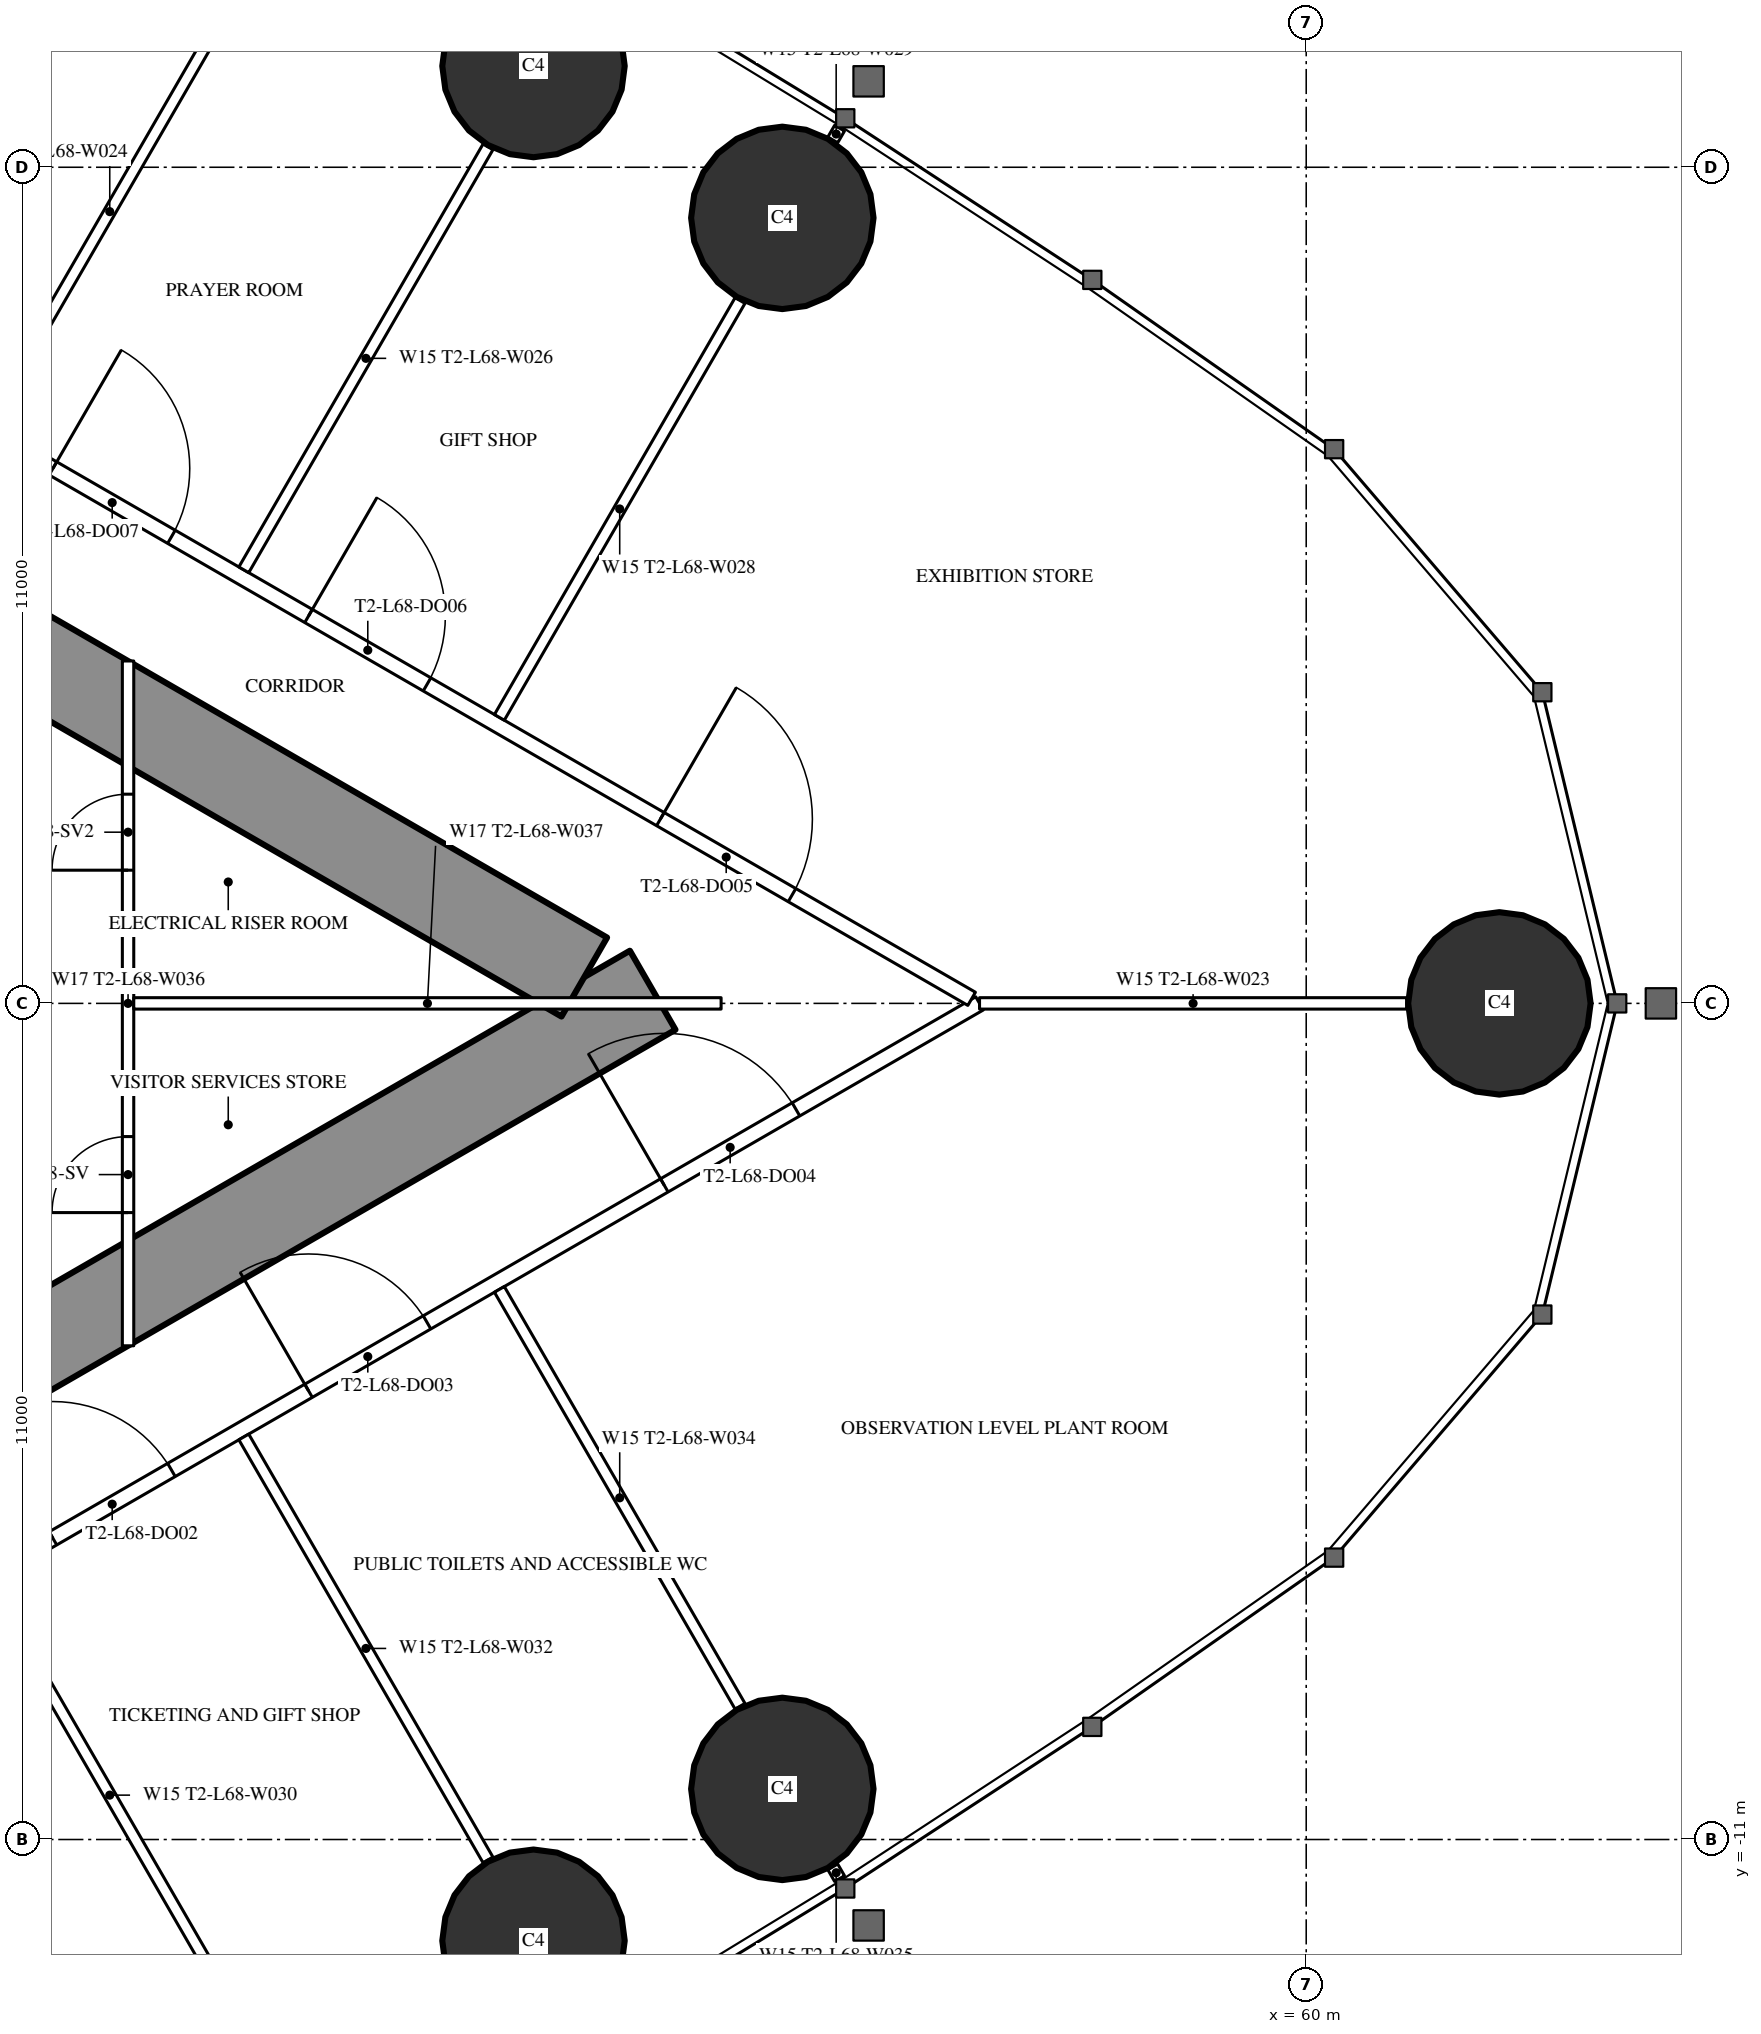
"""IFC4 building model, lengths in metres.
Left out: names, types, materials, properties, quantities, classifications, styles, units other than length and angle.
Written with IfcOpenShell. Run it as: python <this file> out.ifc"""

import sys

from ifc_helpers import new_model, si_unit, direction, frame, frame_2d, origin, origin_2d, place, context, subcontext, project, spatial, rectangle, circle, extrude, element, fill, save


model = new_model("IFC4")
c1 = context("Model", 3, precision=1e-05, world=origin(), true_north=direction((0.0, 1.0)))
c2 = subcontext(c1, "Body", "Model", "MODEL_VIEW")
j1 = project(units=[si_unit("LENGTHUNIT", "METRE"), si_unit("PLANEANGLEUNIT", "RADIAN")], contexts=[c1])
p1 = place(None, origin())
s1 = spatial("IfcSite", under=j1, at=p1, CompositionType="ELEMENT")
p2 = place(p1, origin())
s2 = spatial("IfcBuilding", under=s1, at=p2, CompositionType="ELEMENT")
p3 = place(p2, frame((0.0, 0.0, 257.3)))
s3 = spatial("IfcBuildingStorey", under=s2, at=p3, CompositionType="ELEMENT", Elevation=257.3)
for number, where, z_axis, x_axis in (
    (1, (62.542, 0.0, 0.0), (0.0, 0.0, 1.0), (1.0, 0.0, 0.0)),
    (2, (53.108, 10.334, 0.0), (0.0, 0.0, 1.0), (1.0, 0.0, 0.0)),
    (3, (49.834, 12.332, 0.0), (0.0, 0.0, 1.0), (1.0, 0.0, 0.0)),
    (4, (49.834, -12.332, 0.0), (0.0, 0.0, 1.0), (1.0, 0.0, 0.0)),
    (5, (53.108, -10.334, 0.0), (0.0, 0.0, 1.0), (1.0, 0.0, 0.0)),
):
    element("IfcColumn", number, at=place(p3, frame(where, z_axis=z_axis, x_axis=x_axis)), inside=s3, PredefinedType="COLUMN", context=c2, shape_type="SweptSolid", body=[
        extrude(circle(Radius=1.2, at=origin_2d()), origin(), (0.0, 0.0, 1.0), 6.0),
    ])
p4 = place(p3, frame((27.2, -13.8, 0.0), z_axis=(0.0, 0.0, 1.0), x_axis=(0.866027159892, 0.499996958321, 0.0)))
e6 = element("IfcWall", 6, at=p4, inside=s3, PredefinedType="SHEAR", context=c2, shape_type="SweptSolid", body=[
    extrude(rectangle(XDim=27.947, YDim=1.2, at=frame_2d((13.973, 0.0))), origin(), (0.0, 0.0, 1.0), 6.0),
])
p5 = place(p4, frame((4.6, 0.0, 0.0)))
e7 = element("IfcOpeningElement", 7, at=p5, cuts=e6, PredefinedType="OPENING", context=c2, shape_type="SweptSolid", body=[
    extrude(rectangle(XDim=1.0, YDim=2.2, at=frame_2d((0.5, 1.1))), frame((0.0, 0.61, 0.0), z_axis=(0.0, -1.0, 0.0), x_axis=(1.0, 0.0, 0.0)), (0.0, 0.0, 1.0), 1.22),
])
p6 = place(p4, frame((13.395, 0.0, 0.0)))
e8 = element("IfcOpeningElement", 8, at=p6, cuts=e6, PredefinedType="OPENING", context=c2, shape_type="SweptSolid", body=[
    extrude(rectangle(XDim=1.8, YDim=2.2, at=frame_2d((0.9, 1.1))), frame((0.0, 0.61, 0.0), z_axis=(0.0, -1.0, 0.0), x_axis=(1.0, 0.0, 0.0)), (0.0, 0.0, 1.0), 1.22),
])
p7 = place(p3, frame((27.2, 13.8, 0.0), z_axis=(0.0, 0.0, 1.0), x_axis=(0.866024515034, -0.500001539357, 0.0)))
e9 = element("IfcWall", 9, at=p7, inside=s3, PredefinedType="SHEAR", context=c2, shape_type="SweptSolid", body=[
    extrude(rectangle(XDim=26.907, YDim=1.2, at=frame_2d((13.454, 0.0))), origin(), (0.0, 0.0, 1.0), 6.0),
])
p8 = place(p7, frame((4.6, 0.0, 0.0)))
e10 = element("IfcOpeningElement", 10, at=p8, cuts=e9, PredefinedType="OPENING", context=c2, shape_type="SweptSolid", body=[
    extrude(rectangle(XDim=1.0, YDim=2.2, at=frame_2d((0.5, 1.1))), frame((0.0, 0.61, 0.0), z_axis=(0.0, -1.0, 0.0), x_axis=(1.0, 0.0, 0.0)), (0.0, 0.0, 1.0), 1.22),
])
p9 = place(p7, frame((13.395, 0.0, 0.0)))
e11 = element("IfcOpeningElement", 11, at=p9, cuts=e9, PredefinedType="OPENING", context=c2, shape_type="SweptSolid", body=[
    extrude(rectangle(XDim=1.8, YDim=2.2, at=frame_2d((0.9, 1.1))), frame((0.0, 0.61, 0.0), z_axis=(0.0, -1.0, 0.0), x_axis=(1.0, 0.0, 0.0)), (0.0, 0.0, 1.0), 1.22),
])
p10 = place(p3, frame((28.907, -15.47, 0.0), z_axis=(0.0, 0.0, 1.0), x_axis=(0.866023700353, 0.500002950419, 0.0)))
e12 = element("IfcWall", 12, at=p10, inside=s3, PredefinedType="PARTITIONING", context=c2, shape_type="SweptSolid", body=[
    extrude(rectangle(XDim=30.941, YDim=0.2, at=frame_2d((15.47, 0.0))), origin(), (0.0, 0.0, 1.0), 5.75),
])
p11 = place(p10, frame((7.024, 0.0, 0.0)))
e13 = element("IfcOpeningElement", 13, at=p11, cuts=e12, PredefinedType="OPENING", context=c2, shape_type="SweptSolid", body=[
    extrude(rectangle(XDim=2.0, YDim=2.4, at=frame_2d((1.0, 1.2))), frame((0.0, 0.11, 0.0), z_axis=(0.0, -1.0, 0.0), x_axis=(1.0, 0.0, 0.0)), (0.0, 0.0, 1.0), 0.22),
])
p12 = place(p10, frame((16.865, 0.0, 0.0)))
e14 = element("IfcOpeningElement", 14, at=p12, cuts=e12, PredefinedType="OPENING", context=c2, shape_type="SweptSolid", body=[
    extrude(rectangle(XDim=1.8, YDim=2.2, at=frame_2d((0.9, 1.1))), frame((0.0, 0.11, 0.0), z_axis=(0.0, -1.0, 0.0), x_axis=(1.0, 0.0, 0.0)), (0.0, 0.0, 1.0), 0.22),
])
p13 = place(p10, frame((20.748, 0.0, 0.0)))
e15 = element("IfcOpeningElement", 15, at=p13, cuts=e12, PredefinedType="OPENING", context=c2, shape_type="SweptSolid", body=[
    extrude(rectangle(XDim=1.8, YDim=2.2, at=frame_2d((0.9, 1.1))), frame((0.0, 0.11, 0.0), z_axis=(0.0, -1.0, 0.0), x_axis=(1.0, 0.0, 0.0)), (0.0, 0.0, 1.0), 0.22),
])
p14 = place(p10, frame((26.152, 0.0, 0.0)))
e16 = element("IfcOpeningElement", 16, at=p14, cuts=e12, PredefinedType="OPENING", context=c2, shape_type="SweptSolid", body=[
    extrude(rectangle(XDim=2.0, YDim=2.4, at=frame_2d((1.0, 1.2))), frame((0.0, 0.11, 0.0), z_axis=(0.0, -1.0, 0.0), x_axis=(1.0, 0.0, 0.0)), (0.0, 0.0, 1.0), 0.22),
])
p15 = place(p3, frame((28.907, 15.47, 0.0), z_axis=(0.0, 0.0, 1.0), x_axis=(0.866025841386, -0.499999242051, 0.0)))
e17 = element("IfcWall", 17, at=p15, inside=s3, PredefinedType="PARTITIONING", context=c2, shape_type="SweptSolid", body=[
    extrude(rectangle(XDim=30.821, YDim=0.2, at=frame_2d((15.41, 0.0))), origin(), (0.0, 0.0, 1.0), 5.75),
])
p16 = place(p15, frame((26.092, 0.0, 0.0)))
e18 = element("IfcOpeningElement", 18, at=p16, cuts=e17, PredefinedType="OPENING", context=c2, shape_type="SweptSolid", body=[
    extrude(rectangle(XDim=2.0, YDim=2.4, at=frame_2d((1.0, 1.2))), frame((0.0, 0.11, 0.0), z_axis=(0.0, -1.0, 0.0), x_axis=(1.0, 0.0, 0.0)), (0.0, 0.0, 1.0), 0.22),
])
p17 = place(p15, frame((20.748, 0.0, 0.0)))
e19 = element("IfcOpeningElement", 19, at=p17, cuts=e17, PredefinedType="OPENING", context=c2, shape_type="SweptSolid", body=[
    extrude(rectangle(XDim=1.8, YDim=2.2, at=frame_2d((0.9, 1.1))), frame((0.0, 0.11, 0.0), z_axis=(0.0, -1.0, 0.0), x_axis=(1.0, 0.0, 0.0)), (0.0, 0.0, 1.0), 0.22),
])
p18 = place(p15, frame((16.865, 0.0, 0.0)))
e20 = element("IfcOpeningElement", 20, at=p18, cuts=e17, PredefinedType="OPENING", context=c2, shape_type="SweptSolid", body=[
    extrude(rectangle(XDim=1.8, YDim=2.2, at=frame_2d((0.9, 1.1))), frame((0.0, 0.11, 0.0), z_axis=(0.0, -1.0, 0.0), x_axis=(1.0, 0.0, 0.0)), (0.0, 0.0, 1.0), 0.22),
])
p19 = place(p15, frame((7.024, 0.0, 0.0)))
e21 = element("IfcOpeningElement", 21, at=p19, cuts=e17, PredefinedType="OPENING", context=c2, shape_type="SweptSolid", body=[
    extrude(rectangle(XDim=2.0, YDim=2.4, at=frame_2d((1.0, 1.2))), frame((0.0, 0.11, 0.0), z_axis=(0.0, -1.0, 0.0), x_axis=(1.0, 0.0, 0.0)), (0.0, 0.0, 1.0), 0.22),
])
p20 = place(p3, frame((42.66, -7.646, 0.0), z_axis=(0.0, 0.0, 1.0), x_axis=(0.499996592859, -0.866027370889, 0.0)))
e22 = element("IfcWall", 22, at=p20, inside=s3, PredefinedType="PARTITIONING", context=c2, shape_type="SweptSolid", body=[
    extrude(rectangle(XDim=6.398, YDim=0.15, at=frame_2d((3.199, 0.0))), origin(), (0.0, 0.0, 1.0), 4.85),
])
p21 = place(p3, frame((46.023, -5.704, 0.0), z_axis=(0.0, 0.0, 1.0), x_axis=(0.499984478165, -0.866034365135, 0.0)))
e23 = element("IfcWall", 23, at=p21, inside=s3, PredefinedType="PARTITIONING", context=c2, shape_type="SweptSolid", body=[
    extrude(rectangle(XDim=6.426, YDim=0.15, at=frame_2d((3.213, 0.0))), origin(), (0.0, 0.0, 1.0), 4.85),
])
p22 = place(p3, frame((49.385, -3.763, 0.0), z_axis=(0.0, 0.0, 1.0), x_axis=(0.499999447814, -0.866025722589, 0.0)))
e24 = element("IfcWall", 24, at=p22, inside=s3, PredefinedType="PARTITIONING", context=c2, shape_type="SweptSolid", body=[
    extrude(rectangle(XDim=6.333, YDim=0.15, at=frame_2d((3.166, 0.0))), origin(), (0.0, 0.0, 1.0), 4.85),
])
p23 = place(p3, frame((53.771, -11.36, 0.0), z_axis=(0.0, 0.0, 1.0), x_axis=(0.499524978789, -0.866299483762, 0.0)))
e25 = element("IfcWall", 25, at=p23, inside=s3, PredefinedType="PARTITIONING", context=c2, shape_type="SweptSolid", body=[
    extrude(rectangle(XDim=0.178, YDim=0.15, at=frame_2d((0.089, 0.0))), origin(), (0.0, 0.0, 1.0), 4.85),
])
p24 = place(p3, frame((42.66, 7.646, 0.0), z_axis=(0.0, 0.0, 1.0), x_axis=(0.499996592859, 0.866027370889, 0.0)))
e26 = element("IfcWall", 26, at=p24, inside=s3, PredefinedType="PARTITIONING", context=c2, shape_type="SweptSolid", body=[
    extrude(rectangle(XDim=6.398, YDim=0.15, at=frame_2d((3.199, 0.0))), origin(), (0.0, 0.0, 1.0), 4.85),
])
p25 = place(p3, frame((46.023, 5.704, 0.0), z_axis=(0.0, 0.0, 1.0), x_axis=(0.499984478165, 0.866034365135, 0.0)))
e27 = element("IfcWall", 27, at=p25, inside=s3, PredefinedType="PARTITIONING", context=c2, shape_type="SweptSolid", body=[
    extrude(rectangle(XDim=6.426, YDim=0.15, at=frame_2d((3.213, 0.0))), origin(), (0.0, 0.0, 1.0), 4.85),
])
p26 = place(p3, frame((49.385, 3.763, 0.0), z_axis=(0.0, 0.0, 1.0), x_axis=(0.499999447814, 0.866025722589, 0.0)))
e28 = element("IfcWall", 28, at=p26, inside=s3, PredefinedType="PARTITIONING", context=c2, shape_type="SweptSolid", body=[
    extrude(rectangle(XDim=6.333, YDim=0.15, at=frame_2d((3.166, 0.0))), origin(), (0.0, 0.0, 1.0), 4.85),
])
p27 = place(p3, frame((53.771, 11.36, 0.0), z_axis=(0.0, 0.0, 1.0), x_axis=(0.499524978789, 0.866299483762, 0.0)))
e29 = element("IfcWall", 29, at=p27, inside=s3, PredefinedType="PARTITIONING", context=c2, shape_type="SweptSolid", body=[
    extrude(rectangle(XDim=0.178, YDim=0.15, at=frame_2d((0.089, 0.0))), origin(), (0.0, 0.0, 1.0), 4.85),
])
p28 = place(p3, frame((55.702, 0.0, 0.0), z_axis=(0.0, 0.0, 1.0), x_axis=(1.0, 0.0, 0.0)))
e30 = element("IfcWall", 30, at=p28, inside=s3, PredefinedType="PARTITIONING", context=c2, shape_type="SweptSolid", body=[
    extrude(rectangle(XDim=5.619, YDim=0.15, at=frame_2d((2.81, 0.0))), origin(), (0.0, 0.0, 1.0), 4.85),
])
p29 = place(p3, frame((44.5, -4.505, 0.0), z_axis=(0.0, 0.0, 1.0), x_axis=(0.0, 1.0, 0.0)))
e31 = element("IfcWall", 31, at=p29, inside=s3, PredefinedType="PARTITIONING", context=c2, shape_type="SweptSolid", body=[
    extrude(rectangle(XDim=9.009, YDim=0.15, at=frame_2d((4.505, 0.0))), origin(), (0.0, 0.0, 1.0), 5.75),
])
p30 = place(p29, frame((1.752, 0.0, 0.0)))
e32 = element("IfcOpeningElement", 32, at=p30, cuts=e31, PredefinedType="OPENING", context=c2, shape_type="SweptSolid", body=[
    extrude(rectangle(XDim=1.0, YDim=2.2, at=frame_2d((0.5, 1.1))), frame((0.0, 0.085, 0.0), z_axis=(0.0, -1.0, 0.0), x_axis=(1.0, 0.0, 0.0)), (0.0, 0.0, 1.0), 0.17),
])
p31 = place(p29, frame((6.257, 0.0, 0.0)))
e33 = element("IfcOpeningElement", 33, at=p31, cuts=e31, PredefinedType="OPENING", context=c2, shape_type="SweptSolid", body=[
    extrude(rectangle(XDim=1.0, YDim=2.2, at=frame_2d((0.5, 1.1))), frame((0.0, 0.085, 0.0), z_axis=(0.0, -1.0, 0.0), x_axis=(1.0, 0.0, 0.0)), (0.0, 0.0, 1.0), 0.17),
])
p32 = place(p3, frame((44.575, 0.0, 0.0), z_axis=(0.0, 0.0, 1.0), x_axis=(1.0, 0.0, 0.0)))
e34 = element("IfcWall", 34, at=p32, inside=s3, PredefinedType="PARTITIONING", context=c2, shape_type="SweptSolid", body=[
    extrude(rectangle(XDim=7.727, YDim=0.15, at=frame_2d((3.864, 0.0))), origin(), (0.0, 0.0, 1.0), 4.85),
])
p33 = place(p12, origin())
e35 = element("IfcDoor", 35, at=p33, inside=s3, OperationType="DOUBLE_DOOR_SINGLE_SWING", PredefinedType="DOOR", context=c2, shape_type="SweptSolid", body=[
    extrude(rectangle(XDim=1.8, YDim=2.2, at=frame_2d((0.9, 1.1))), frame((0.0, 0.025, 0.0), z_axis=(0.0, -1.0, 0.0), x_axis=(1.0, 0.0, 0.0)), (0.0, 0.0, 1.0), 0.05),
])
fill(e14, e35)
p34 = place(p13, origin())
e36 = element("IfcDoor", 36, at=p34, inside=s3, OperationType="DOUBLE_DOOR_SINGLE_SWING", PredefinedType="DOOR", context=c2, shape_type="SweptSolid", body=[
    extrude(rectangle(XDim=1.8, YDim=2.2, at=frame_2d((0.9, 1.1))), frame((0.0, 0.025, 0.0), z_axis=(0.0, -1.0, 0.0), x_axis=(1.0, 0.0, 0.0)), (0.0, 0.0, 1.0), 0.05),
])
fill(e15, e36)
p35 = place(p14, origin())
e37 = element("IfcDoor", 37, at=p35, inside=s3, OperationType="DOUBLE_DOOR_SINGLE_SWING", PredefinedType="DOOR", context=c2, shape_type="SweptSolid", body=[
    extrude(rectangle(XDim=2.0, YDim=2.4, at=frame_2d((1.0, 1.2))), frame((0.0, 0.025, 0.0), z_axis=(0.0, -1.0, 0.0), x_axis=(1.0, 0.0, 0.0)), (0.0, 0.0, 1.0), 0.05),
])
fill(e16, e37)
p36 = place(p16, origin())
e38 = element("IfcDoor", 38, at=p36, inside=s3, OperationType="DOUBLE_DOOR_SINGLE_SWING", PredefinedType="DOOR", context=c2, shape_type="SweptSolid", body=[
    extrude(rectangle(XDim=2.0, YDim=2.4, at=frame_2d((1.0, 1.2))), frame((0.0, 0.025, 0.0), z_axis=(0.0, -1.0, 0.0), x_axis=(1.0, 0.0, 0.0)), (0.0, 0.0, 1.0), 0.05),
])
fill(e18, e38)
p37 = place(p17, origin())
e39 = element("IfcDoor", 39, at=p37, inside=s3, OperationType="DOUBLE_DOOR_SINGLE_SWING", PredefinedType="DOOR", context=c2, shape_type="SweptSolid", body=[
    extrude(rectangle(XDim=1.8, YDim=2.2, at=frame_2d((0.9, 1.1))), frame((0.0, 0.025, 0.0), z_axis=(0.0, -1.0, 0.0), x_axis=(1.0, 0.0, 0.0)), (0.0, 0.0, 1.0), 0.05),
])
fill(e19, e39)
p38 = place(p18, origin())
e40 = element("IfcDoor", 40, at=p38, inside=s3, OperationType="DOUBLE_DOOR_SINGLE_SWING", PredefinedType="DOOR", context=c2, shape_type="SweptSolid", body=[
    extrude(rectangle(XDim=1.8, YDim=2.2, at=frame_2d((0.9, 1.1))), frame((0.0, 0.025, 0.0), z_axis=(0.0, -1.0, 0.0), x_axis=(1.0, 0.0, 0.0)), (0.0, 0.0, 1.0), 0.05),
])
fill(e20, e40)
p39 = place(p30, origin())
e41 = element("IfcDoor", 41, at=p39, inside=s3, OperationType="SINGLE_SWING_LEFT", PredefinedType="DOOR", context=c2, shape_type="SweptSolid", body=[
    extrude(rectangle(XDim=1.0, YDim=2.2, at=frame_2d((0.5, 1.1))), frame((0.0, 0.025, 0.0), z_axis=(0.0, -1.0, 0.0), x_axis=(1.0, 0.0, 0.0)), (0.0, 0.0, 1.0), 0.05),
])
fill(e32, e41)
p40 = place(p31, origin())
e42 = element("IfcDoor", 42, at=p40, inside=s3, OperationType="SINGLE_SWING_LEFT", PredefinedType="DOOR", context=c2, shape_type="SweptSolid", body=[
    extrude(rectangle(XDim=1.0, YDim=2.2, at=frame_2d((0.5, 1.1))), frame((0.0, 0.025, 0.0), z_axis=(0.0, -1.0, 0.0), x_axis=(1.0, 0.0, 0.0)), (0.0, 0.0, 1.0), 0.05),
])
fill(e33, e42)
save(model, sys.argv[1])
